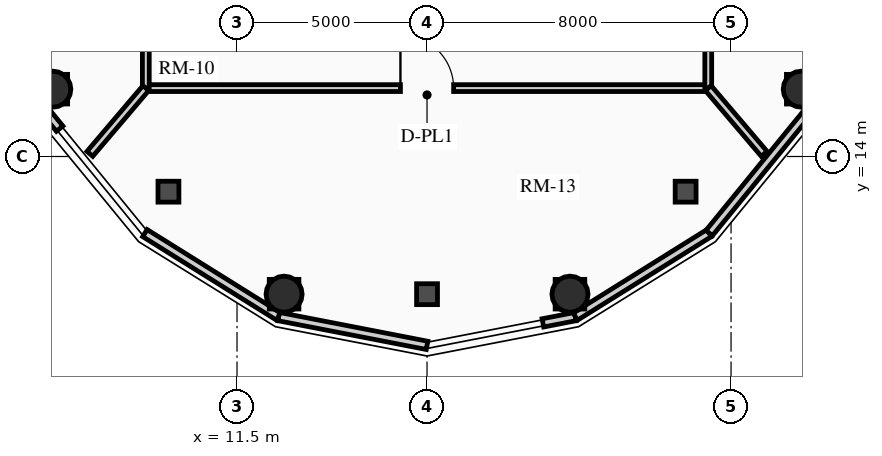
"""IFC4 building model, lengths in metres.
Left out: names, types, materials, properties, quantities, classifications, styles, units other than length and angle.
Written with IfcOpenShell. Run it as: python <this file> out.ifc"""

import sys

from ifc_helpers import new_model, si_unit, direction, frame, frame_2d, origin, origin_2d, place, context, subcontext, project, spatial, rectangle, circle, extrude, source, transform, mapped, element, fill, save


model = new_model("IFC4")
c1 = context("Model", 3, precision=1e-05, world=origin(), true_north=direction((0.0, 1.0)))
c2 = subcontext(c1, "Body", "Model", "MODEL_VIEW")
j1 = project(units=[si_unit("LENGTHUNIT", "METRE"), si_unit("PLANEANGLEUNIT", "RADIAN")], contexts=[c1])
p1 = place(None, origin())
s1 = spatial("IfcSite", under=j1, at=p1, CompositionType="ELEMENT")
p2 = place(p1, origin())
s2 = spatial("IfcBuilding", under=s1, at=p2, CompositionType="ELEMENT")
p3 = place(p2, frame((0.0, 0.0, 240.33)))
s3 = spatial("IfcBuildingStorey", under=s2, at=p3, CompositionType="ELEMENT", Elevation=240.33)
for number, where, z_axis, x_axis in (
    (1, (6.653, 15.771, 0.0), (0.0, 0.0, 1.0), (1.0, 0.0, 0.0)),
    (2, (12.739, 10.377, 0.0), (0.0, 0.0, 1.0), (1.0, 0.0, 0.0)),
    (3, (20.261, 10.377, 0.0), (0.0, 0.0, 1.0), (1.0, 0.0, 0.0)),
    (4, (26.347, 15.771, 0.0), (0.0, 0.0, 1.0), (1.0, 0.0, 0.0)),
):
    element("IfcColumn", number, at=place(p3, frame(where, z_axis=z_axis, x_axis=x_axis)), inside=s3, PredefinedType="COLUMN", context=c2, shape_type="SweptSolid", body=[
        extrude(circle(Radius=0.475, at=origin_2d()), origin(), (0.0, 0.0, 1.0), 4.5),
    ])
p4 = place(p3, frame((6.832, 14.733, 0.0), z_axis=(0.0, 0.0, 1.0), x_axis=(-0.632534570862, 0.774532127587, 0.0)))
e5 = element("IfcWall", 5, at=p4, inside=s3, PredefinedType="SOLIDWALL", context=c2, shape_type="SweptSolid", body=[
    extrude(rectangle(XDim=0.87, YDim=0.22, at=frame_2d((0.435, 0.0))), origin(), (0.0, 0.0, 1.0), 3.556),
])
p5 = place(p3, frame((12.597, 9.787, 0.0), z_axis=(0.0, 0.0, 1.0), x_axis=(-0.848318713376, 0.529485939886, 0.0)))
e6 = element("IfcWall", 6, at=p5, inside=s3, PredefinedType="SOLIDWALL", context=c2, shape_type="SweptSolid", body=[
    extrude(rectangle(XDim=4.15, YDim=0.22, at=frame_2d((2.075, 0.0))), origin(), (0.0, 0.0, 1.0), 3.556),
])
p6 = place(p3, frame((16.5, 9.03, 0.0), z_axis=(0.0, 0.0, 1.0), x_axis=(-0.981700307484, 0.190432419211, 0.0)))
e7 = element("IfcWall", 7, at=p6, inside=s3, PredefinedType="SOLIDWALL", context=c2, shape_type="SweptSolid", body=[
    extrude(rectangle(XDim=3.976, YDim=0.22, at=frame_2d((1.988, 0.0))), origin(), (0.0, 0.0, 1.0), 3.556),
])
p7 = place(p3, frame((20.403, 9.787, 0.0), z_axis=(0.0, 0.0, 1.0), x_axis=(-0.981729145882, -0.190283693799, 0.0)))
e8 = element("IfcWall", 8, at=p7, inside=s3, PredefinedType="SOLIDWALL", context=c2, shape_type="SweptSolid", body=[
    extrude(rectangle(XDim=0.87, YDim=0.22, at=frame_2d((0.435, 0.0))), origin(), (0.0, 0.0, 1.0), 3.556),
])
p8 = place(p3, frame((23.924, 11.985, 0.0), z_axis=(0.0, 0.0, 1.0), x_axis=(-0.848318713376, -0.529485939886, 0.0)))
e9 = element("IfcWall", 9, at=p8, inside=s3, PredefinedType="SOLIDWALL", context=c2, shape_type="SweptSolid", body=[
    extrude(rectangle(XDim=4.15, YDim=0.22, at=frame_2d((2.075, 0.0))), origin(), (0.0, 0.0, 1.0), 3.556),
])
p9 = place(p3, frame((26.718, 15.407, 0.0), z_axis=(0.0, 0.0, 1.0), x_axis=(-0.632467166636, -0.774587169483, 0.0)))
e10 = element("IfcWall", 10, at=p9, inside=s3, PredefinedType="SOLIDWALL", context=c2, shape_type="SweptSolid", body=[
    extrude(rectangle(XDim=4.418, YDim=0.22, at=frame_2d((2.209, 0.0))), origin(), (0.0, 0.0, 1.0), 3.556),
])
p10 = place(p3, frame((9.1, 15.8, 0.0), z_axis=(0.0, 0.0, 1.0), x_axis=(1.0, 0.0, 0.0)))
e11 = element("IfcWall", 11, at=p10, inside=s3, PredefinedType="PARTITIONING", context=c2, shape_type="SweptSolid", body=[
    extrude(rectangle(XDim=14.8, YDim=0.18, at=frame_2d((7.4, 0.0))), origin(), (0.0, 0.0, 1.0), 3.476),
])
m1 = source(origin(), c2, "Body", "SweptSolid", [
    extrude(rectangle(XDim=1.4, YDim=2.02, at=frame_2d((0.7, 1.01))), frame((0.0, 0.1, 0.0), z_axis=(0.0, -1.0, 0.0), x_axis=(1.0, 0.0, 0.0)), (0.0, 0.0, 1.0), 0.2),
])
p11 = place(p10, frame((6.7, 0.0, 0.0)))
e12 = element("IfcOpeningElement", 12, at=p11, cuts=e11, PredefinedType="OPENING", context=c2, shape_type="MappedRepresentation", body=[
    mapped(m1, transform((0.0, 0.0, 0.0), x_axis=(1.0, 0.0, 0.0), y_axis=(0.0, 1.0, 0.0), z_axis=(0.0, 0.0, 1.0), scale=1.0)),
])
p12 = place(p3, frame((9.1, 15.8, 0.0), z_axis=(0.0, 0.0, 1.0), x_axis=(0.0, 1.0, 0.0)))
e13 = element("IfcWall", 13, at=p12, inside=s3, PredefinedType="PARTITIONING", context=c2, shape_type="SweptSolid", body=[
    extrude(rectangle(XDim=15.55, YDim=0.18, at=frame_2d((7.775, 0.0))), origin(), (0.0, 0.0, 1.0), 3.476),
])
p13 = place(p12, frame((7.075, 0.0, 0.0)))
e14 = element("IfcOpeningElement", 14, at=p13, cuts=e13, PredefinedType="OPENING", context=c2, shape_type="MappedRepresentation", body=[
    mapped(m1, transform((0.0, 0.0, 0.0), x_axis=(1.0, 0.0, 0.0), y_axis=(0.0, 1.0, 0.0), z_axis=(0.0, 0.0, 1.0), scale=1.0)),
])
p14 = place(p3, frame((23.9, 15.8, 0.0), z_axis=(0.0, 0.0, 1.0), x_axis=(0.0, 1.0, 0.0)))
e15 = element("IfcWall", 15, at=p14, inside=s3, PredefinedType="PARTITIONING", context=c2, shape_type="SweptSolid", body=[
    extrude(rectangle(XDim=15.55, YDim=0.18, at=frame_2d((7.775, 0.0))), origin(), (0.0, 0.0, 1.0), 3.476),
])
p15 = place(p14, frame((7.075, 0.0, 0.0)))
e16 = element("IfcOpeningElement", 16, at=p15, cuts=e15, PredefinedType="OPENING", context=c2, shape_type="MappedRepresentation", body=[
    mapped(m1, transform((0.0, 0.0, 0.0), x_axis=(1.0, 0.0, 0.0), y_axis=(0.0, 1.0, 0.0), z_axis=(0.0, 0.0, 1.0), scale=1.0)),
])
for number, where, z_axis, x_axis in (
    (17, (23.9, 15.8, 0.0), (0.0, 0.0, 1.0), (0.648, -0.762, 0.0)),
    (18, (9.1, 15.8, 0.0), (0.0, 0.0, 1.0), (-0.648, -0.762, 0.0)),
):
    element("IfcWall", number, at=place(p3, frame(where, z_axis=z_axis, x_axis=x_axis)), inside=s3, PredefinedType="PARTITIONING", context=c2, shape_type="SweptSolid", body=[
        extrude(rectangle(XDim=2.272, YDim=0.2, at=frame_2d((1.136, 0.0))), origin(), (0.0, 0.0, 1.0), 3.556),
    ])
m2 = source(origin(), c2, "Body", "SweptSolid", [
    extrude(rectangle(XDim=1.4, YDim=2.02, at=frame_2d((0.7, 1.01))), frame((0.0, 0.025, 0.0), z_axis=(0.0, -1.0, 0.0), x_axis=(1.0, 0.0, 0.0)), (0.0, 0.0, 1.0), 0.05),
])
p16 = place(p11, origin())
e19 = element("IfcDoor", 19, at=p16, inside=s3, OperationType="SINGLE_SWING_LEFT", PredefinedType="DOOR", context=c2, shape_type="MappedRepresentation", body=[
    mapped(m2, transform((0.0, 0.0, 0.0), x_axis=(1.0, 0.0, 0.0), y_axis=(0.0, 1.0, 0.0), z_axis=(0.0, 0.0, 1.0), scale=1.0)),
])
fill(e12, e19)
save(model, sys.argv[1])
